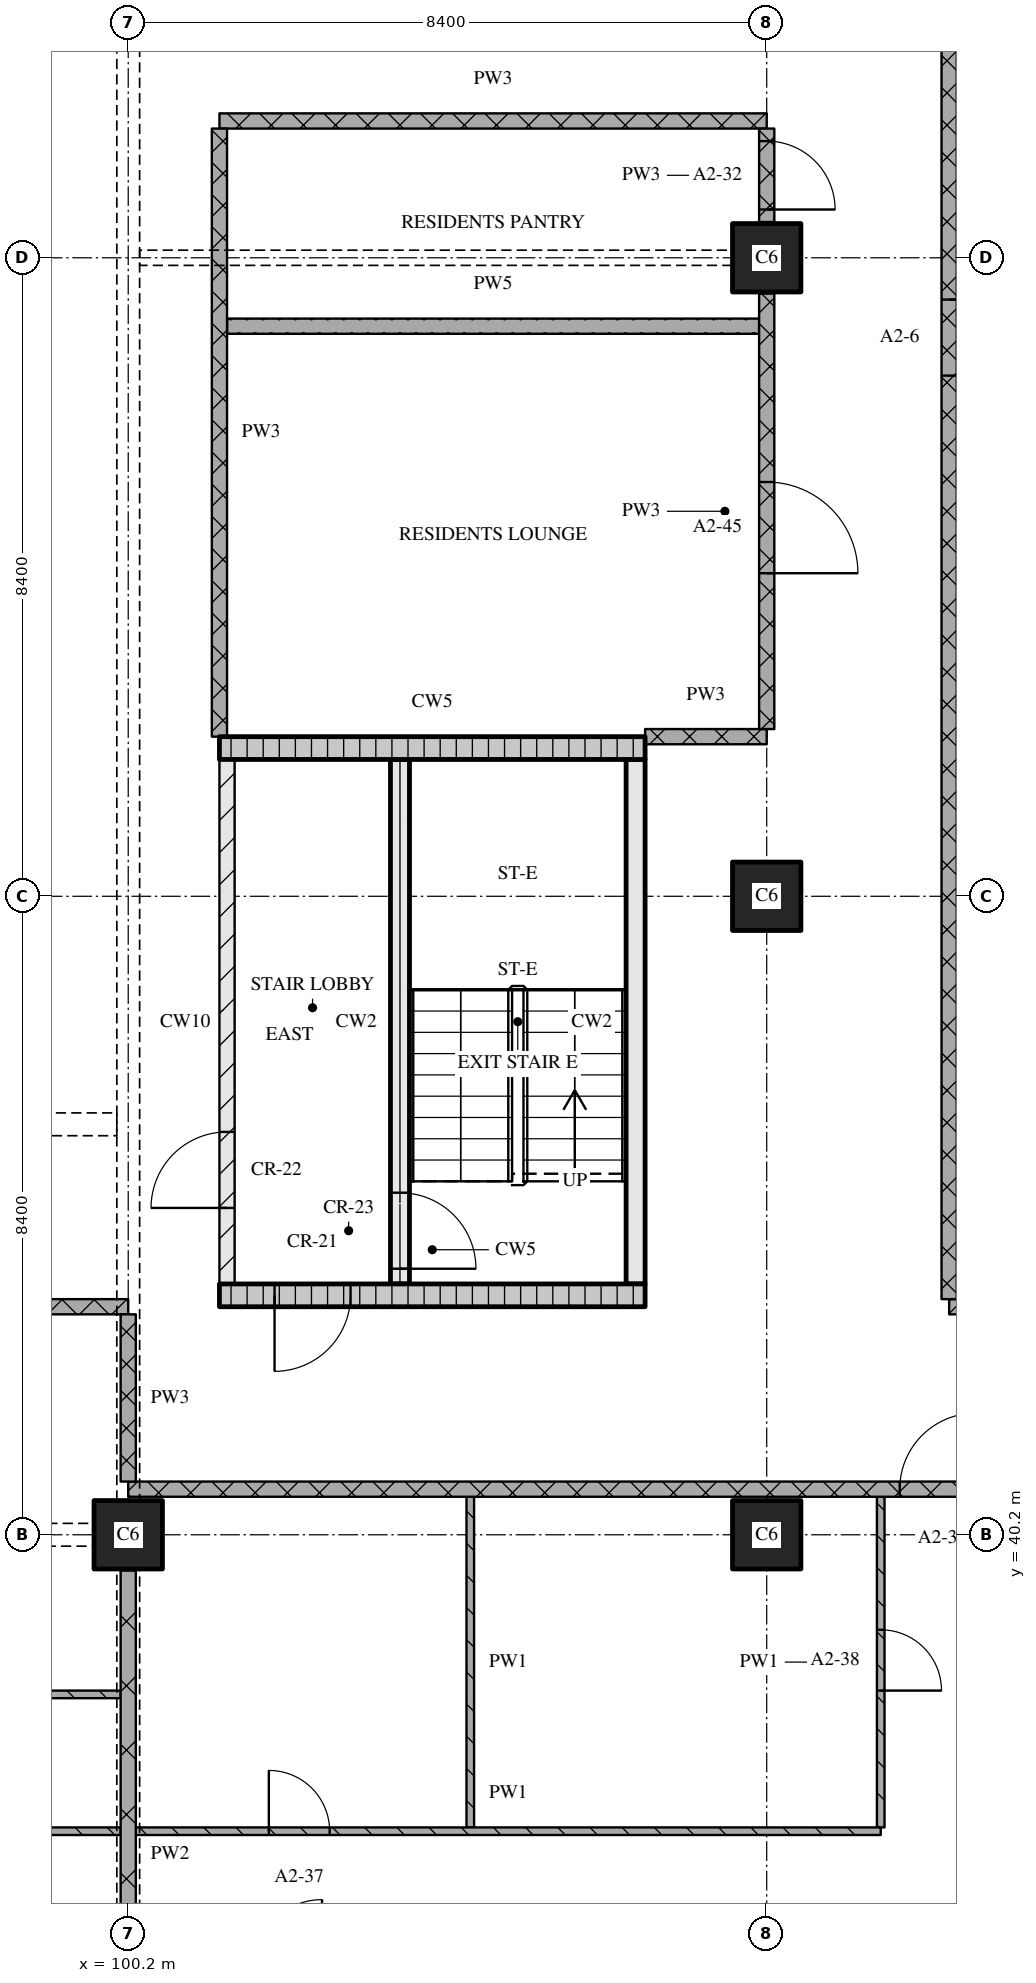
"""IFC4 building model, lengths in metres.
Left out: names, types, materials, properties, quantities, classifications, styles, units other than length and angle.
Written with IfcOpenShell. Run it as: python <this file> out.ifc"""

import sys

from ifc_helpers import new_model, si_unit, direction, frame, frame_2d, origin, origin_2d, place, context, subcontext, project, spatial, rectangle, extrude, element, fill, save


model = new_model("IFC4")
c1 = context("Model", 3, precision=1e-05, world=origin(), true_north=direction((0.0, 1.0)))
c2 = subcontext(c1, "Body", "Model", "MODEL_VIEW")
j1 = project(units=[si_unit("LENGTHUNIT", "METRE"), si_unit("PLANEANGLEUNIT", "RADIAN")], contexts=[c1])
p1 = place(None, origin())
s1 = spatial("IfcSite", under=j1, at=p1, CompositionType="ELEMENT")
p2 = place(p1, origin())
s2 = spatial("IfcBuilding", under=s1, at=p2, CompositionType="ELEMENT")
p3 = place(p2, frame((0.0, 0.0, 51.6)))
s3 = spatial("IfcBuildingStorey", under=s2, at=p3, CompositionType="ELEMENT", Elevation=51.6)
for number, where, z_axis, x_axis in (
    (1, (100.2, 40.2, 0.0), (0.0, 0.0, 1.0), (1.0, 0.0, 0.0)),
    (2, (108.6, 40.2, 0.0), (0.0, 0.0, 1.0), (1.0, 0.0, 0.0)),
    (3, (108.6, 48.6, 0.0), (0.0, 0.0, 1.0), (1.0, 0.0, 0.0)),
    (4, (108.6, 57.0, 0.0), (0.0, 0.0, 1.0), (1.0, 0.0, 0.0)),
):
    element("IfcColumn", number, at=place(p3, frame(where, z_axis=z_axis, x_axis=x_axis)), inside=s3, PredefinedType="COLUMN", context=c2, shape_type="SweptSolid", body=[
        extrude(rectangle(XDim=0.9, YDim=0.9, at=origin_2d()), origin(), (0.0, 0.0, 1.0), 3.6),
    ])
p4 = place(p3, frame((101.4, 43.35, 0.0), z_axis=(0.0, 0.0, 1.0), x_axis=(1.0, 0.0, 0.0)))
e5 = element("IfcWall", 5, at=p4, inside=s3, PredefinedType="SOLIDWALL", context=c2, shape_type="SweptSolid", body=[
    extrude(rectangle(XDim=5.6, YDim=0.3, at=frame_2d((2.8, 0.0))), origin(), (0.0, 0.0, 1.0), 3.32),
])
p5 = place(p4, frame((0.725, 0.0, 0.0)))
e6 = element("IfcOpeningElement", 6, at=p5, cuts=e5, PredefinedType="OPENING", context=c2, shape_type="SweptSolid", body=[
    extrude(rectangle(XDim=1.0, YDim=2.1, at=frame_2d((0.5, 1.05))), frame((0.0, 0.16, 0.0), z_axis=(0.0, -1.0, 0.0), x_axis=(1.0, 0.0, 0.0)), (0.0, 0.0, 1.0), 0.32),
])
p6 = place(p3, frame((101.5, 43.5, 0.0), z_axis=(0.0, 0.0, 1.0), x_axis=(0.0, 1.0, 0.0)))
e7 = element("IfcWall", 7, at=p6, inside=s3, PredefinedType="PARTITIONING", context=c2, shape_type="SweptSolid", body=[
    extrude(rectangle(XDim=6.9, YDim=0.2, at=frame_2d((3.45, 0.0))), origin(), (0.0, 0.0, 1.0), 3.32),
])
p7 = place(p6, frame((1.0, 0.0, 0.0)))
e8 = element("IfcOpeningElement", 8, at=p7, cuts=e7, PredefinedType="OPENING", context=c2, shape_type="SweptSolid", body=[
    extrude(rectangle(XDim=1.0, YDim=2.1, at=frame_2d((0.5, 1.05))), frame((0.0, 0.11, 0.0), z_axis=(0.0, -1.0, 0.0), x_axis=(1.0, 0.0, 0.0)), (0.0, 0.0, 1.0), 0.22),
])
p8 = place(p3, frame((103.775, 43.5, 0.0), z_axis=(0.0, 0.0, 1.0), x_axis=(0.0, 1.0, 0.0)))
e9 = element("IfcWall", 9, at=p8, inside=s3, PredefinedType="SOLIDWALL", context=c2, shape_type="SweptSolid", body=[
    extrude(rectangle(XDim=6.9, YDim=0.25, at=frame_2d((3.45, 0.0))), origin(), (0.0, 0.0, 1.0), 3.32),
])
p9 = place(p8, frame((0.2, 0.0, 0.0)))
e10 = element("IfcOpeningElement", 10, at=p9, cuts=e9, PredefinedType="OPENING", context=c2, shape_type="SweptSolid", body=[
    extrude(rectangle(XDim=1.0, YDim=2.1, at=frame_2d((0.5, 1.05))), frame((0.0, 0.135, 0.0), z_axis=(0.0, -1.0, 0.0), x_axis=(1.0, 0.0, 0.0)), (0.0, 0.0, 1.0), 0.27),
])
p10 = place(p3, frame((106.875, 43.5, 0.0), z_axis=(0.0, 0.0, 1.0), x_axis=(0.0, 1.0, 0.0)))
e11 = element("IfcWall", 11, at=p10, inside=s3, PredefinedType="SOLIDWALL", context=c2, shape_type="SweptSolid", body=[
    extrude(rectangle(XDim=6.9, YDim=0.25, at=frame_2d((3.45, 0.0))), origin(), (0.0, 0.0, 1.0), 3.32),
])
p11 = place(p3, frame((101.4, 50.55, 0.0), z_axis=(0.0, 0.0, 1.0), x_axis=(1.0, 0.0, 0.0)))
e12 = element("IfcWall", 12, at=p11, inside=s3, PredefinedType="SOLIDWALL", context=c2, shape_type="SweptSolid", body=[
    extrude(rectangle(XDim=5.6, YDim=0.3, at=frame_2d((2.8, 0.0))), origin(), (0.0, 0.0, 1.0), 3.32),
])
p12 = place(p3, frame((92.4, 38.1, 0.0), z_axis=(0.0, 0.0, 1.0), x_axis=(1.0, 0.0, 0.0)))
e13 = element("IfcWall", 13, at=p12, inside=s3, PredefinedType="PARTITIONING", context=c2, shape_type="SweptSolid", body=[
    extrude(rectangle(XDim=7.7, YDim=0.1, at=frame_2d((3.85, 0.0))), origin(), (0.0, 0.0, 1.0), 3.32),
])
p13 = place(p12, frame((5.75, 0.0, 0.0)))
e14 = element("IfcOpeningElement", 14, at=p13, cuts=e13, PredefinedType="OPENING", context=c2, shape_type="SweptSolid", body=[
    extrude(rectangle(XDim=0.8, YDim=2.1, at=frame_2d((0.4, 1.05))), frame((0.0, 0.06, 0.0), z_axis=(0.0, -1.0, 0.0), x_axis=(1.0, 0.0, 0.0)), (0.0, 0.0, 1.0), 0.12),
])
p14 = place(p3, frame((124.28, 40.8, 0.0), z_axis=(0.0, 0.0, 1.0), x_axis=(-1.0, 0.0, 0.0)))
e15 = element("IfcWall", 15, at=p14, inside=s3, PredefinedType="PARTITIONING", context=c2, shape_type="SweptSolid", body=[
    extrude(rectangle(XDim=24.08, YDim=0.2, at=frame_2d((12.04, 0.0))), origin(), (0.0, 0.0, 1.0), 3.32),
])
p15 = place(p14, frame((12.93, 0.0, 0.0)))
e16 = element("IfcOpeningElement", 16, at=p15, cuts=e15, PredefinedType="OPENING", context=c2, shape_type="SweptSolid", body=[
    extrude(rectangle(XDim=1.0, YDim=2.1, at=frame_2d((0.5, 1.05))), frame((0.0, 0.11, 0.0), z_axis=(0.0, -1.0, 0.0), x_axis=(1.0, 0.0, 0.0)), (0.0, 0.0, 1.0), 0.22),
])
p16 = place(p3, frame((100.2, 43.2, 0.0), z_axis=(0.0, 0.0, 1.0), x_axis=(-1.0, 0.0, 0.0)))
e17 = element("IfcWall", 17, at=p16, inside=s3, PredefinedType="PARTITIONING", context=c2, shape_type="SweptSolid", body=[
    extrude(rectangle(XDim=25.2, YDim=0.2, at=frame_2d((12.6, 0.0))), origin(), (0.0, 0.0, 1.0), 3.32),
])
p17 = place(p16, frame((8.05, 0.0, 0.0)))
e18 = element("IfcOpeningElement", 18, at=p17, cuts=e17, PredefinedType="OPENING", context=c2, shape_type="SweptSolid", body=[
    extrude(rectangle(XDim=1.0, YDim=2.1, at=frame_2d((0.5, 1.05))), frame((0.0, 0.11, 0.0), z_axis=(0.0, -1.0, 0.0), x_axis=(1.0, 0.0, 0.0)), (0.0, 0.0, 1.0), 0.22),
])
p18 = place(p3, frame((111.0, 43.2, 0.0), z_axis=(0.0, 0.0, 1.0), x_axis=(1.0, 0.0, 0.0)))
e19 = element("IfcWall", 19, at=p18, inside=s3, PredefinedType="PARTITIONING", context=c2, shape_type="SweptSolid", body=[
    extrude(rectangle(XDim=15.92, YDim=0.2, at=frame_2d((7.96, 0.0))), origin(), (0.0, 0.0, 1.0), 3.32),
])
p19 = place(p3, frame((107.0, 50.7, 0.0), z_axis=(0.0, 0.0, 1.0), x_axis=(1.0, 0.0, 0.0)))
e20 = element("IfcWall", 20, at=p19, inside=s3, PredefinedType="PARTITIONING", context=c2, shape_type="SweptSolid", body=[
    extrude(rectangle(XDim=1.6, YDim=0.2, at=frame_2d((0.8, 0.0))), origin(), (0.0, 0.0, 1.0), 3.32),
])
p20 = place(p3, frame((101.5, 56.1, 0.0), z_axis=(0.0, 0.0, 1.0), x_axis=(1.0, 0.0, 0.0)))
e21 = element("IfcWall", 21, at=p20, inside=s3, PredefinedType="PARTITIONING", context=c2, shape_type="SweptSolid", body=[
    extrude(rectangle(XDim=7.0, YDim=0.2, at=frame_2d((3.5, 0.0))), origin(), (0.0, 0.0, 1.0), 3.32),
])
p21 = place(p3, frame((111.1, 56.7, 0.0), z_axis=(0.0, 0.0, 1.0), x_axis=(1.0, 0.0, 0.0)))
e22 = element("IfcWall", 22, at=p21, inside=s3, PredefinedType="PARTITIONING", context=c2, shape_type="SweptSolid", body=[
    extrude(rectangle(XDim=5.43, YDim=0.1, at=frame_2d((2.715, 0.0))), origin(), (0.0, 0.0, 1.0), 3.32),
])
p22 = place(p21, frame((4.45, 0.0, 0.0)))
e23 = element("IfcOpeningElement", 23, at=p22, cuts=e22, PredefinedType="OPENING", context=c2, shape_type="SweptSolid", body=[
    extrude(rectangle(XDim=0.8, YDim=2.1, at=frame_2d((0.4, 1.05))), frame((0.0, 0.06, 0.0), z_axis=(0.0, -1.0, 0.0), x_axis=(1.0, 0.0, 0.0)), (0.0, 0.0, 1.0), 0.12),
])
p23 = place(p3, frame((101.4, 58.8, 0.0), z_axis=(0.0, 0.0, 1.0), x_axis=(1.0, 0.0, 0.0)))
e24 = element("IfcWall", 24, at=p23, inside=s3, PredefinedType="PARTITIONING", context=c2, shape_type="SweptSolid", body=[
    extrude(rectangle(XDim=7.2, YDim=0.2, at=frame_2d((3.6, 0.0))), origin(), (0.0, 0.0, 1.0), 3.32),
])
p24 = place(p3, frame((100.2, 43.1, 0.0), z_axis=(0.0, 0.0, 1.0), x_axis=(0.0, -1.0, 0.0)))
e25 = element("IfcWall", 25, at=p24, inside=s3, PredefinedType="PARTITIONING", context=c2, shape_type="SweptSolid", body=[
    extrude(rectangle(XDim=2.2, YDim=0.2, at=frame_2d((1.1, 0.0))), origin(), (0.0, 0.0, 1.0), 2.43),
])
p25 = place(p3, frame((100.2, 39.73, 0.0), z_axis=(0.0, 0.0, 1.0), x_axis=(0.0, -1.0, 0.0)))
e26 = element("IfcWall", 26, at=p25, inside=s3, PredefinedType="PARTITIONING", context=c2, shape_type="SweptSolid", body=[
    extrude(rectangle(XDim=7.46, YDim=0.2, at=frame_2d((3.73, 0.0))), origin(), (0.0, 0.0, 1.0), 2.83),
])
p26 = place(p3, frame((101.4, 58.7, 0.0), z_axis=(0.0, 0.0, 1.0), x_axis=(0.0, -1.0, 0.0)))
e27 = element("IfcWall", 27, at=p26, inside=s3, PredefinedType="PARTITIONING", context=c2, shape_type="SweptSolid", body=[
    extrude(rectangle(XDim=8.0, YDim=0.2, at=frame_2d((4.0, 0.0))), origin(), (0.0, 0.0, 1.0), 3.32),
])
p27 = place(p3, frame((104.7, 40.7, 0.0), z_axis=(0.0, 0.0, 1.0), x_axis=(0.0, -1.0, 0.0)))
e28 = element("IfcWall", 28, at=p27, inside=s3, PredefinedType="PARTITIONING", context=c2, shape_type="SweptSolid", body=[
    extrude(rectangle(XDim=4.35, YDim=0.1, at=frame_2d((2.175, 0.0))), origin(), (0.0, 0.0, 1.0), 3.32),
])
p28 = place(p3, frame((108.6, 50.8, 0.0), z_axis=(0.0, 0.0, 1.0), x_axis=(0.0, 1.0, 0.0)))
e29 = element("IfcWall", 29, at=p28, inside=s3, PredefinedType="PARTITIONING", context=c2, shape_type="SweptSolid", body=[
    extrude(rectangle(XDim=5.73, YDim=0.2, at=frame_2d((2.865, 0.0))), origin(), (0.0, 0.0, 1.0), 3.32),
])
p29 = place(p28, frame((2.05, 0.0, 0.0)))
e30 = element("IfcOpeningElement", 30, at=p29, cuts=e29, PredefinedType="OPENING", context=c2, shape_type="SweptSolid", body=[
    extrude(rectangle(XDim=1.2, YDim=2.1, at=frame_2d((0.6, 1.05))), frame((0.0, 0.11, 0.0), z_axis=(0.0, -1.0, 0.0), x_axis=(1.0, 0.0, 0.0)), (0.0, 0.0, 1.0), 0.22),
])
p30 = place(p3, frame((108.6, 57.47, 0.0), z_axis=(0.0, 0.0, 1.0), x_axis=(0.0, 1.0, 0.0)))
e31 = element("IfcWall", 31, at=p30, inside=s3, PredefinedType="PARTITIONING", context=c2, shape_type="SweptSolid", body=[
    extrude(rectangle(XDim=1.23, YDim=0.2, at=frame_2d((0.615, 0.0))), origin(), (0.0, 0.0, 1.0), 3.32),
])
p31 = place(p30, frame((0.165, 0.0, 0.0)))
e32 = element("IfcOpeningElement", 32, at=p31, cuts=e31, PredefinedType="OPENING", context=c2, shape_type="SweptSolid", body=[
    extrude(rectangle(XDim=0.9, YDim=2.1, at=frame_2d((0.45, 1.05))), frame((0.0, 0.11, 0.0), z_axis=(0.0, -1.0, 0.0), x_axis=(1.0, 0.0, 0.0)), (0.0, 0.0, 1.0), 0.22),
])
p32 = place(p3, frame((110.1, 36.35, 0.0), z_axis=(0.0, 0.0, 1.0), x_axis=(0.0, 1.0, 0.0)))
e33 = element("IfcWall", 33, at=p32, inside=s3, PredefinedType="PARTITIONING", context=c2, shape_type="SweptSolid", body=[
    extrude(rectangle(XDim=4.35, YDim=0.1, at=frame_2d((2.175, 0.0))), origin(), (0.0, 0.0, 1.0), 3.32),
])
p33 = place(p32, frame((1.8, 0.0, 0.0)))
e34 = element("IfcOpeningElement", 34, at=p33, cuts=e33, PredefinedType="OPENING", context=c2, shape_type="SweptSolid", body=[
    extrude(rectangle(XDim=0.8, YDim=2.1, at=frame_2d((0.4, 1.05))), frame((0.0, 0.06, 0.0), z_axis=(0.0, -1.0, 0.0), x_axis=(1.0, 0.0, 0.0)), (0.0, 0.0, 1.0), 0.12),
])
p34 = place(p3, frame((111.0, 75.32, 0.0), z_axis=(0.0, 0.0, 1.0), x_axis=(0.0, -1.0, 0.0)))
e35 = element("IfcWall", 35, at=p34, inside=s3, PredefinedType="PARTITIONING", context=c2, shape_type="SweptSolid", body=[
    extrude(rectangle(XDim=32.02, YDim=0.2, at=frame_2d((16.01, 0.0))), origin(), (0.0, 0.0, 1.0), 3.32),
])
p35 = place(p34, frame((4.47, 0.0, 0.0)))
e36 = element("IfcOpeningElement", 36, at=p35, cuts=e35, PredefinedType="OPENING", context=c2, shape_type="SweptSolid", body=[
    extrude(rectangle(XDim=1.0, YDim=2.1, at=frame_2d((0.5, 1.05))), frame((0.0, 0.11, 0.0), z_axis=(0.0, -1.0, 0.0), x_axis=(1.0, 0.0, 0.0)), (0.0, 0.0, 1.0), 0.22),
])
p36 = place(p34, frame((18.87, 0.0, 0.0)))
e37 = element("IfcOpeningElement", 37, at=p36, cuts=e35, PredefinedType="OPENING", context=c2, shape_type="SweptSolid", body=[
    extrude(rectangle(XDim=1.0, YDim=2.1, at=frame_2d((0.5, 1.05))), frame((0.0, 0.11, 0.0), z_axis=(0.0, -1.0, 0.0), x_axis=(1.0, 0.0, 0.0)), (0.0, 0.0, 1.0), 0.22),
])
p37 = place(p3, frame((100.1, 36.3, 0.0), z_axis=(0.0, 0.0, 1.0), x_axis=(-1.0, 0.0, 0.0)))
e38 = element("IfcWall", 38, at=p37, inside=s3, PredefinedType="PARTITIONING", context=c2, shape_type="SweptSolid", body=[
    extrude(rectangle(XDim=12.5, YDim=0.1, at=frame_2d((6.25, 0.0))), origin(), (0.0, 0.0, 1.0), 3.32),
])
p38 = place(p37, frame((1.55, 0.0, 0.0)))
e39 = element("IfcOpeningElement", 39, at=p38, cuts=e38, PredefinedType="OPENING", context=c2, shape_type="SweptSolid", body=[
    extrude(rectangle(XDim=0.9, YDim=2.1, at=frame_2d((0.45, 1.05))), frame((0.0, 0.06, 0.0), z_axis=(0.0, -1.0, 0.0), x_axis=(1.0, 0.0, 0.0)), (0.0, 0.0, 1.0), 0.12),
])
p39 = place(p37, frame((7.85, 0.0, 0.0)))
e40 = element("IfcOpeningElement", 40, at=p39, cuts=e38, PredefinedType="OPENING", context=c2, shape_type="SweptSolid", body=[
    extrude(rectangle(XDim=0.9, YDim=2.1, at=frame_2d((0.45, 1.05))), frame((0.0, 0.06, 0.0), z_axis=(0.0, -1.0, 0.0), x_axis=(1.0, 0.0, 0.0)), (0.0, 0.0, 1.0), 0.12),
])
p40 = place(p3, frame((100.3, 36.3, 0.0), z_axis=(0.0, 0.0, 1.0), x_axis=(1.0, 0.0, 0.0)))
e41 = element("IfcWall", 41, at=p40, inside=s3, PredefinedType="PARTITIONING", context=c2, shape_type="SweptSolid", body=[
    extrude(rectangle(XDim=9.8, YDim=0.1, at=frame_2d((4.9, 0.0))), origin(), (0.0, 0.0, 1.0), 3.32),
])
p41 = place(p40, frame((1.75, 0.0, 0.0)))
e42 = element("IfcOpeningElement", 42, at=p41, cuts=e41, PredefinedType="OPENING", context=c2, shape_type="SweptSolid", body=[
    extrude(rectangle(XDim=0.8, YDim=2.1, at=frame_2d((0.4, 1.05))), frame((0.0, 0.06, 0.0), z_axis=(0.0, -1.0, 0.0), x_axis=(1.0, 0.0, 0.0)), (0.0, 0.0, 1.0), 0.12),
])
p42 = place(p5, origin())
e43 = element("IfcDoor", 43, at=p42, inside=s3, OperationType="SINGLE_SWING_RIGHT", PredefinedType="DOOR", context=c2, shape_type="SweptSolid", body=[
    extrude(rectangle(XDim=1.0, YDim=2.1, at=frame_2d((0.5, 1.05))), frame((0.0, 0.025, 0.0), z_axis=(0.0, -1.0, 0.0), x_axis=(1.0, 0.0, 0.0)), (0.0, 0.0, 1.0), 0.05),
])
fill(e6, e43)
p43 = place(p9, origin())
e44 = element("IfcDoor", 44, at=p43, inside=s3, OperationType="SINGLE_SWING_RIGHT", PredefinedType="DOOR", context=c2, shape_type="SweptSolid", body=[
    extrude(rectangle(XDim=1.0, YDim=2.1, at=frame_2d((0.5, 1.05))), frame((0.0, 0.025, 0.0), z_axis=(0.0, -1.0, 0.0), x_axis=(1.0, 0.0, 0.0)), (0.0, 0.0, 1.0), 0.05),
])
fill(e10, e44)
p44 = place(p7, origin())
e45 = element("IfcDoor", 45, at=p44, inside=s3, OperationType="SINGLE_SWING_LEFT", PredefinedType="DOOR", context=c2, shape_type="SweptSolid", body=[
    extrude(rectangle(XDim=1.0, YDim=2.1, at=frame_2d((0.5, 1.05))), frame((0.0, 0.025, 0.0), z_axis=(0.0, -1.0, 0.0), x_axis=(1.0, 0.0, 0.0)), (0.0, 0.0, 1.0), 0.05),
])
fill(e8, e45)
p45 = place(p15, origin())
e46 = element("IfcDoor", 46, at=p45, inside=s3, OperationType="SINGLE_SWING_RIGHT", PredefinedType="DOOR", context=c2, shape_type="SweptSolid", body=[
    extrude(rectangle(XDim=1.0, YDim=2.1, at=frame_2d((0.5, 1.05))), frame((0.0, 0.025, 0.0), z_axis=(0.0, -1.0, 0.0), x_axis=(1.0, 0.0, 0.0)), (0.0, 0.0, 1.0), 0.05),
])
fill(e16, e46)
p46 = place(p29, origin())
e47 = element("IfcDoor", 47, at=p46, inside=s3, OperationType="SINGLE_SWING_RIGHT", PredefinedType="DOOR", context=c2, shape_type="SweptSolid", body=[
    extrude(rectangle(XDim=1.2, YDim=2.1, at=frame_2d((0.6, 1.05))), frame((0.0, 0.025, 0.0), z_axis=(0.0, -1.0, 0.0), x_axis=(1.0, 0.0, 0.0)), (0.0, 0.0, 1.0), 0.05),
])
fill(e30, e47)
p47 = place(p31, origin())
e48 = element("IfcDoor", 48, at=p47, inside=s3, OperationType="SINGLE_SWING_RIGHT", PredefinedType="DOOR", context=c2, shape_type="SweptSolid", body=[
    extrude(rectangle(XDim=0.9, YDim=2.1, at=frame_2d((0.45, 1.05))), frame((0.0, 0.025, 0.0), z_axis=(0.0, -1.0, 0.0), x_axis=(1.0, 0.0, 0.0)), (0.0, 0.0, 1.0), 0.05),
])
fill(e32, e48)
p48 = place(p33, origin())
e49 = element("IfcDoor", 49, at=p48, inside=s3, OperationType="SINGLE_SWING_RIGHT", PredefinedType="DOOR", context=c2, shape_type="SweptSolid", body=[
    extrude(rectangle(XDim=0.8, YDim=2.1, at=frame_2d((0.4, 1.05))), frame((0.0, 0.025, 0.0), z_axis=(0.0, -1.0, 0.0), x_axis=(1.0, 0.0, 0.0)), (0.0, 0.0, 1.0), 0.05),
])
fill(e34, e49)
p49 = place(p36, origin())
e50 = element("IfcDoor", 50, at=p49, inside=s3, OperationType="SINGLE_SWING_LEFT", PredefinedType="DOOR", context=c2, shape_type="SweptSolid", body=[
    extrude(rectangle(XDim=1.0, YDim=2.1, at=frame_2d((0.5, 1.05))), frame((0.0, 0.025, 0.0), z_axis=(0.0, -1.0, 0.0), x_axis=(1.0, 0.0, 0.0)), (0.0, 0.0, 1.0), 0.05),
])
fill(e37, e50)
p50 = place(p41, origin())
e51 = element("IfcDoor", 51, at=p50, inside=s3, OperationType="SINGLE_SWING_LEFT", PredefinedType="DOOR", context=c2, shape_type="SweptSolid", body=[
    extrude(rectangle(XDim=0.8, YDim=2.1, at=frame_2d((0.4, 1.05))), frame((0.0, 0.025, 0.0), z_axis=(0.0, -1.0, 0.0), x_axis=(1.0, 0.0, 0.0)), (0.0, 0.0, 1.0), 0.05),
])
fill(e42, e51)
save(model, sys.argv[1])
